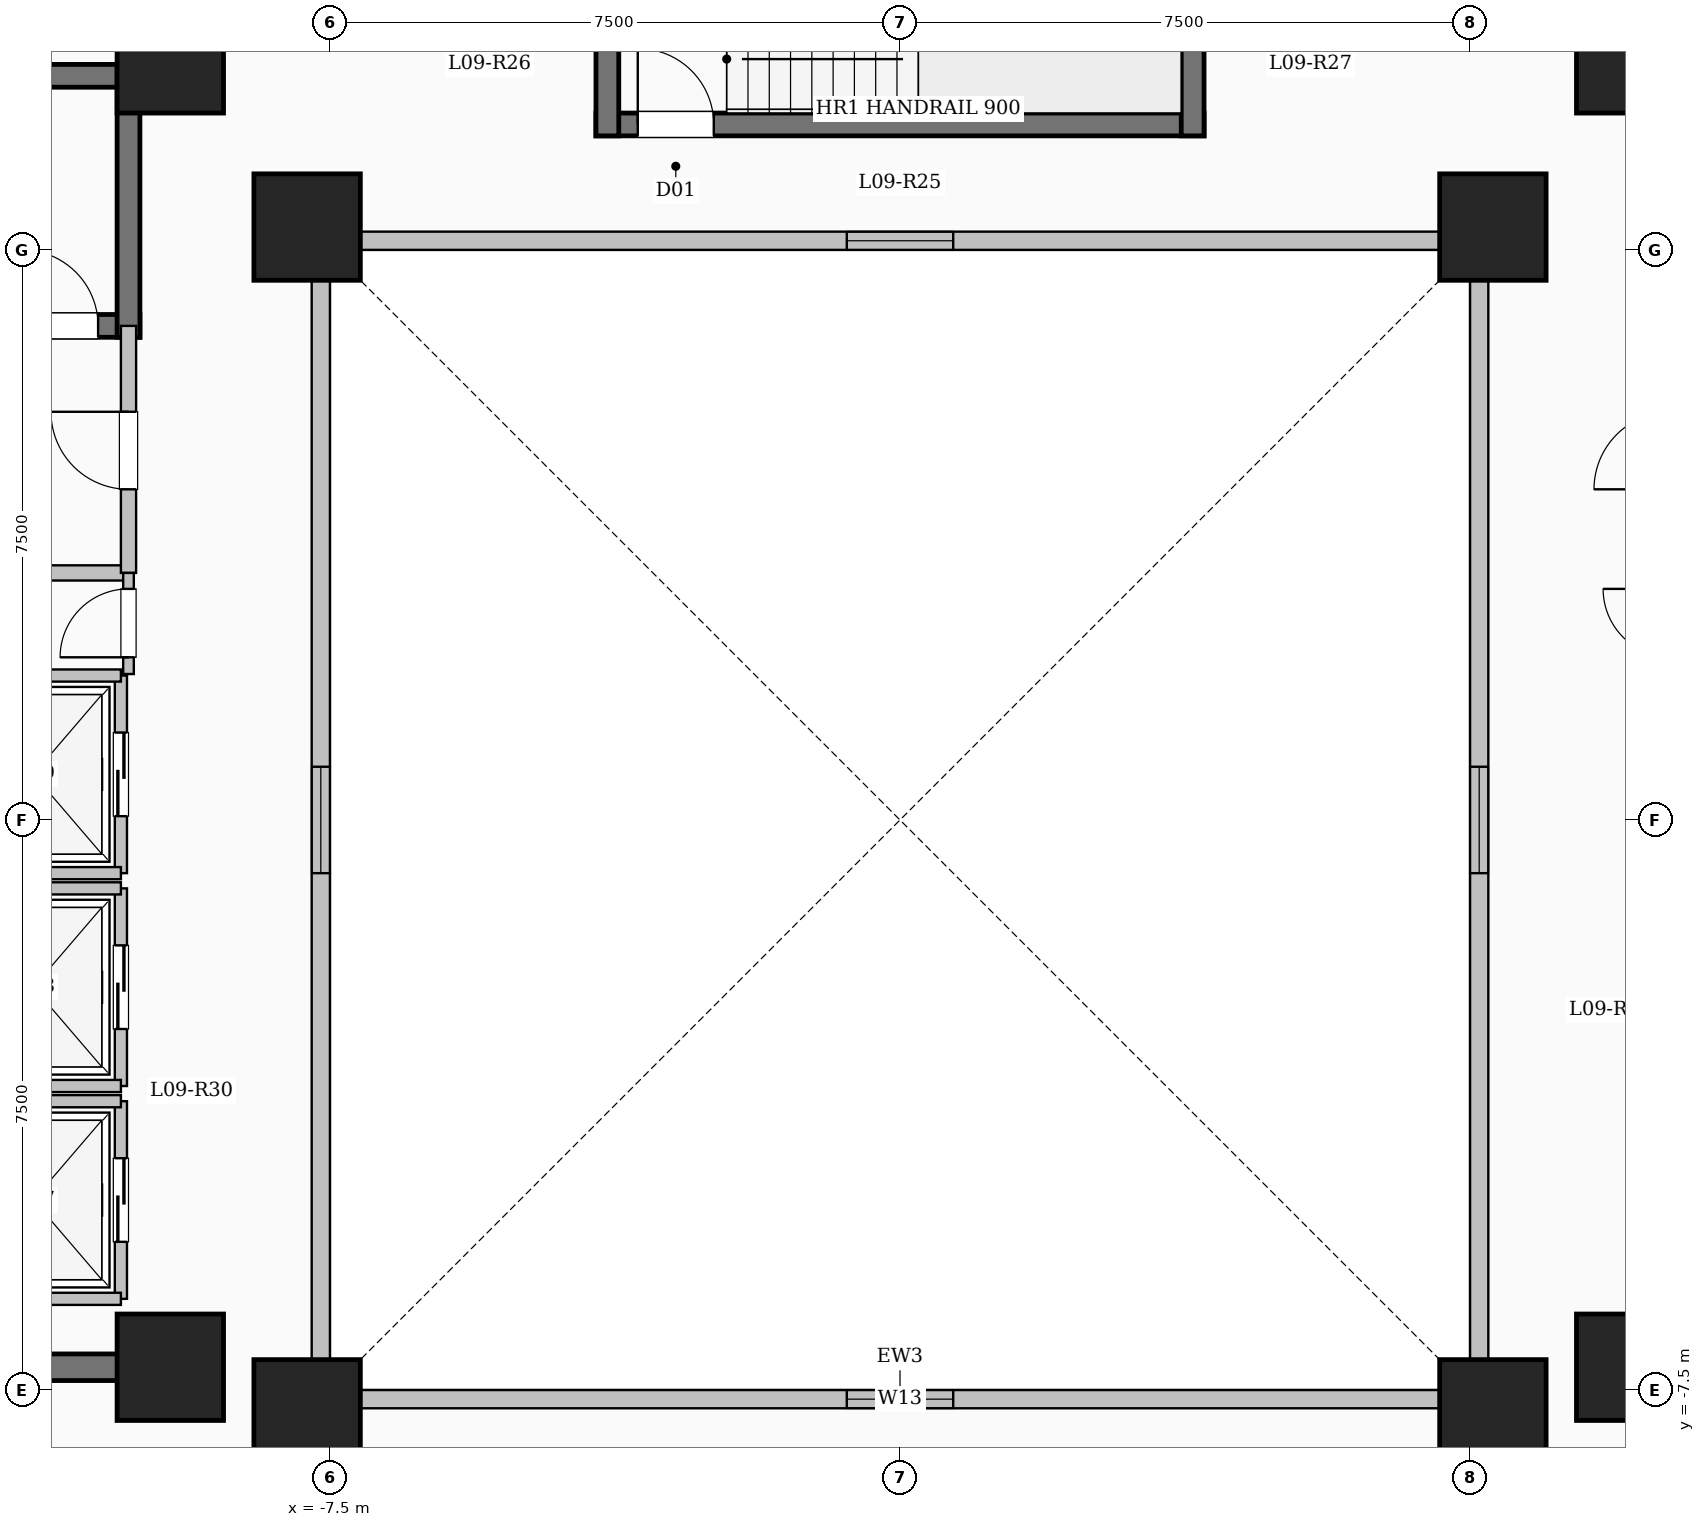
"""IFC4 building model, lengths in metres.
Left out: names, types, materials, properties, quantities, classifications, styles, units other than length and angle.
Written with IfcOpenShell. Run it as: python <this file> out.ifc"""

import sys

from ifc_helpers import new_model, si_unit, direction, frame, frame_2d, origin, origin_2d, place, context, subcontext, project, spatial, rectangle, extrude, element, fill, save


model = new_model("IFC4")
c1 = context("Model", 3, precision=1e-05, world=origin(), true_north=direction((0.0, 1.0)))
c2 = subcontext(c1, "Body", "Model", "MODEL_VIEW")
j1 = project(units=[si_unit("LENGTHUNIT", "METRE"), si_unit("PLANEANGLEUNIT", "RADIAN")], contexts=[c1])
p1 = place(None, origin())
s1 = spatial("IfcSite", under=j1, at=p1, CompositionType="ELEMENT")
p2 = place(p1, origin())
s2 = spatial("IfcBuilding", under=s1, at=p2, CompositionType="ELEMENT")
p3 = place(p2, frame((0.0, 0.0, 37.4)))
s3 = spatial("IfcBuildingStorey", under=s2, at=p3, CompositionType="ELEMENT", Elevation=37.4)
for number, where, z_axis, x_axis in (
    (1, (-7.8, -7.8, 0.0), (0.0, 0.0, 1.0), (1.0, 0.0, 0.0)),
    (2, (7.8, -7.8, 0.0), (0.0, 0.0, 1.0), (1.0, 0.0, 0.0)),
    (3, (-7.8, 7.8, 0.0), (0.0, 0.0, 1.0), (1.0, 0.0, 0.0)),
    (4, (7.8, 7.8, 0.0), (0.0, 0.0, 1.0), (1.0, 0.0, 0.0)),
    (5, (-9.6, -7.2, 0.0), (0.0, 0.0, 1.0), (1.0, 0.0, 0.0)),
    (6, (-9.6, 10.0, 0.0), (0.0, 0.0, 1.0), (1.0, 0.0, 0.0)),
    (7, (9.6, -7.2, 0.0), (0.0, 0.0, 1.0), (1.0, 0.0, 0.0)),
    (8, (9.6, 10.0, 0.0), (0.0, 0.0, 1.0), (1.0, 0.0, 0.0)),
):
    element("IfcColumn", number, at=place(p3, frame(where, z_axis=z_axis, x_axis=x_axis)), inside=s3, PredefinedType="COLUMN", context=c2, shape_type="SweptSolid", body=[
        extrude(rectangle(XDim=1.4, YDim=1.4, at=origin_2d()), origin(), (0.0, 0.0, 1.0), 3.35),
    ])
p4 = place(p3, frame((-7.62, -7.62, 0.0), z_axis=(0.0, 0.0, 1.0), x_axis=(1.0, 0.0, 0.0)))
e9 = element("IfcWall", 9, at=p4, inside=s3, PredefinedType="SOLIDWALL", context=c2, shape_type="SweptSolid", body=[
    extrude(rectangle(XDim=15.24, YDim=0.24, at=frame_2d((7.62, 0.0))), origin(), (0.0, 0.0, 1.0), 3.1),
])
p5 = place(p4, frame((6.92, 0.0, 0.95)))
e10 = element("IfcOpeningElement", 10, at=p5, cuts=e9, PredefinedType="OPENING", context=c2, shape_type="SweptSolid", body=[
    extrude(rectangle(XDim=1.4, YDim=1.5, at=frame_2d((0.7, 0.75))), frame((0.0, 0.13, 0.0), z_axis=(0.0, -1.0, 0.0), x_axis=(1.0, 0.0, 0.0)), (0.0, 0.0, 1.0), 0.26),
])
p6 = place(p3, frame((7.62, -7.62, 0.0), z_axis=(0.0, 0.0, 1.0), x_axis=(0.0, 1.0, 0.0)))
e11 = element("IfcWall", 11, at=p6, inside=s3, PredefinedType="SOLIDWALL", context=c2, shape_type="SweptSolid", body=[
    extrude(rectangle(XDim=15.24, YDim=0.24, at=frame_2d((7.62, 0.0))), origin(), (0.0, 0.0, 1.0), 3.1),
])
p7 = place(p6, frame((6.92, 0.0, 0.95)))
e12 = element("IfcOpeningElement", 12, at=p7, cuts=e11, PredefinedType="OPENING", context=c2, shape_type="SweptSolid", body=[
    extrude(rectangle(XDim=1.4, YDim=1.5, at=frame_2d((0.7, 0.75))), frame((0.0, 0.13, 0.0), z_axis=(0.0, -1.0, 0.0), x_axis=(1.0, 0.0, 0.0)), (0.0, 0.0, 1.0), 0.26),
])
p8 = place(p3, frame((7.62, 7.62, 0.0), z_axis=(0.0, 0.0, 1.0), x_axis=(-1.0, 0.0, 0.0)))
e13 = element("IfcWall", 13, at=p8, inside=s3, PredefinedType="SOLIDWALL", context=c2, shape_type="SweptSolid", body=[
    extrude(rectangle(XDim=15.24, YDim=0.24, at=frame_2d((7.62, 0.0))), origin(), (0.0, 0.0, 1.0), 3.1),
])
p9 = place(p8, frame((6.92, 0.0, 0.95)))
e14 = element("IfcOpeningElement", 14, at=p9, cuts=e13, PredefinedType="OPENING", context=c2, shape_type="SweptSolid", body=[
    extrude(rectangle(XDim=1.4, YDim=1.5, at=frame_2d((0.7, 0.75))), frame((0.0, 0.13, 0.0), z_axis=(0.0, -1.0, 0.0), x_axis=(1.0, 0.0, 0.0)), (0.0, 0.0, 1.0), 0.26),
])
p10 = place(p3, frame((-7.62, 7.62, 0.0), z_axis=(0.0, 0.0, 1.0), x_axis=(0.0, -1.0, 0.0)))
e15 = element("IfcWall", 15, at=p10, inside=s3, PredefinedType="SOLIDWALL", context=c2, shape_type="SweptSolid", body=[
    extrude(rectangle(XDim=15.24, YDim=0.24, at=frame_2d((7.62, 0.0))), origin(), (0.0, 0.0, 1.0), 3.1),
])
p11 = place(p10, frame((6.92, 0.0, 0.95)))
e16 = element("IfcOpeningElement", 16, at=p11, cuts=e15, PredefinedType="OPENING", context=c2, shape_type="SweptSolid", body=[
    extrude(rectangle(XDim=1.4, YDim=1.5, at=frame_2d((0.7, 0.75))), frame((0.0, 0.13, 0.0), z_axis=(0.0, -1.0, 0.0), x_axis=(1.0, 0.0, 0.0)), (0.0, 0.0, 1.0), 0.26),
])
p12 = place(p3, frame((-18.0, 9.79, 0.0), z_axis=(0.0, 0.0, 1.0), x_axis=(1.0, 0.0, 0.0)))
e17 = element("IfcWall", 17, at=p12, inside=s3, PredefinedType="SHEAR", context=c2, shape_type="SweptSolid", body=[
    extrude(rectangle(XDim=8.0, YDim=0.3, at=frame_2d((4.0, 0.0))), origin(), (0.0, 0.0, 1.0), 3.35),
])
p13 = place(p3, frame((-18.0, 6.5, 0.0), z_axis=(0.0, 0.0, 1.0), x_axis=(1.0, 0.0, 0.0)))
e18 = element("IfcWall", 18, at=p13, inside=s3, PredefinedType="SHEAR", context=c2, shape_type="SweptSolid", body=[
    extrude(rectangle(XDim=8.0, YDim=0.3, at=frame_2d((4.0, 0.0))), origin(), (0.0, 0.0, 1.0), 3.35),
])
p14 = place(p13, frame((6.45, 0.0, 0.0)))
e19 = element("IfcOpeningElement", 19, at=p14, cuts=e18, PredefinedType="OPENING", context=c2, shape_type="SweptSolid", body=[
    extrude(rectangle(XDim=1.0, YDim=2.15, at=frame_2d((0.5, 1.075))), frame((0.0, 0.16, 0.0), z_axis=(0.0, -1.0, 0.0), x_axis=(1.0, 0.0, 0.0)), (0.0, 0.0, 1.0), 0.32),
])
p15 = place(p3, frame((-10.15, 6.35, 0.0), z_axis=(0.0, 0.0, 1.0), x_axis=(0.0, 1.0, 0.0)))
e20 = element("IfcWall", 20, at=p15, inside=s3, PredefinedType="SHEAR", context=c2, shape_type="SweptSolid", body=[
    extrude(rectangle(XDim=3.59, YDim=0.3, at=frame_2d((1.795, 0.0))), origin(), (0.0, 0.0, 1.0), 3.35),
])
p16 = place(p3, frame((-4.0, 9.15, 0.0), z_axis=(0.0, 0.0, 1.0), x_axis=(1.0, 0.0, 0.0)))
e21 = element("IfcWall", 21, at=p16, inside=s3, PredefinedType="SHEAR", context=c2, shape_type="SweptSolid", body=[
    extrude(rectangle(XDim=8.0, YDim=0.3, at=frame_2d((4.0, 0.0))), origin(), (0.0, 0.0, 1.0), 3.35),
])
p17 = place(p16, frame((0.55, 0.0, 0.0)))
e22 = element("IfcOpeningElement", 22, at=p17, cuts=e21, PredefinedType="OPENING", context=c2, shape_type="SweptSolid", body=[
    extrude(rectangle(XDim=1.0, YDim=2.15, at=frame_2d((0.5, 1.075))), frame((0.0, 0.16, 0.0), z_axis=(0.0, -1.0, 0.0), x_axis=(1.0, 0.0, 0.0)), (0.0, 0.0, 1.0), 0.32),
])
for number, where, z_axis, x_axis in (
    (23, (-3.85, 9.0, 0.0), (0.0, 0.0, 1.0), (0.0, 1.0, 0.0)),
    (24, (3.85, 9.0, 0.0), (0.0, 0.0, 1.0), (0.0, 1.0, 0.0)),
):
    element("IfcWall", number, at=place(p3, frame(where, z_axis=z_axis, x_axis=x_axis)), inside=s3, PredefinedType="SHEAR", context=c2, shape_type="SweptSolid", body=[
        extrude(rectangle(XDim=3.59, YDim=0.3, at=frame_2d((1.795, 0.0))), origin(), (0.0, 0.0, 1.0), 3.35),
    ])
p18 = place(p3, frame((-15.55, 3.25, 0.0), z_axis=(0.0, 0.0, 1.0), x_axis=(1.0, 0.0, 0.0)))
e25 = element("IfcWall", 25, at=p18, inside=s3, PredefinedType="SOLIDWALL", context=c2, shape_type="SweptSolid", body=[
    extrude(rectangle(XDim=5.4, YDim=0.2, at=frame_2d((2.7, 0.0))), origin(), (0.0, 0.0, 1.0), 3.1),
])
p19 = place(p3, frame((-10.15, 3.25, 0.0), z_axis=(0.0, 0.0, 1.0), x_axis=(0.0, 1.0, 0.0)))
e26 = element("IfcWall", 26, at=p19, inside=s3, PredefinedType="SOLIDWALL", context=c2, shape_type="SweptSolid", body=[
    extrude(rectangle(XDim=3.25, YDim=0.2, at=frame_2d((1.625, 0.0))), origin(), (0.0, 0.0, 1.0), 3.1),
])
p20 = place(p19, frame((1.1, 0.0, 0.0)))
e27 = element("IfcOpeningElement", 27, at=p20, cuts=e26, PredefinedType="OPENING", context=c2, shape_type="SweptSolid", body=[
    extrude(rectangle(XDim=1.02, YDim=2.15, at=frame_2d((0.51, 1.075))), frame((0.0, 0.11, 0.0), z_axis=(0.0, -1.0, 0.0), x_axis=(1.0, 0.0, 0.0)), (0.0, 0.0, 1.0), 0.22),
])
p21 = place(p3, frame((-10.25, -6.3, 0.0), z_axis=(0.0, 0.0, 1.0), x_axis=(0.0, 1.0, 0.0)))
e28 = element("IfcWall", 28, at=p21, inside=s3, PredefinedType="SOLIDWALL", context=c2, shape_type="SweptSolid", body=[
    extrude(rectangle(XDim=2.6, YDim=0.16, at=frame_2d((1.3, 0.0))), origin(), (0.0, 0.0, 1.0), 3.1),
])
p22 = place(p21, frame((0.75, 0.0, 0.0)))
e29 = element("IfcOpeningElement", 29, at=p22, cuts=e28, PredefinedType="OPENING", context=c2, shape_type="SweptSolid", body=[
    extrude(rectangle(XDim=1.1, YDim=2.15, at=frame_2d((0.55, 1.075))), frame((0.0, 0.09, 0.0), z_axis=(0.0, -1.0, 0.0), x_axis=(1.0, 0.0, 0.0)), (0.0, 0.0, 1.0), 0.18),
])
for number, where, z_axis, x_axis in (
    (30, (-12.55, -6.3, 0.0), (0.0, 0.0, 1.0), (1.0, 0.0, 0.0)),
    (31, (-12.55, -3.7, 0.0), (0.0, 0.0, 1.0), (1.0, 0.0, 0.0)),
):
    element("IfcWall", number, at=place(p3, frame(where, z_axis=z_axis, x_axis=x_axis)), inside=s3, PredefinedType="SOLIDWALL", context=c2, shape_type="SweptSolid", body=[
        extrude(rectangle(XDim=2.3, YDim=0.16, at=frame_2d((1.15, 0.0))), origin(), (0.0, 0.0, 1.0), 3.1),
    ])
p23 = place(p3, frame((-10.25, -3.5, 0.0), z_axis=(0.0, 0.0, 1.0), x_axis=(0.0, 1.0, 0.0)))
e32 = element("IfcWall", 32, at=p23, inside=s3, PredefinedType="SOLIDWALL", context=c2, shape_type="SweptSolid", body=[
    extrude(rectangle(XDim=2.6, YDim=0.16, at=frame_2d((1.3, 0.0))), origin(), (0.0, 0.0, 1.0), 3.1),
])
p24 = place(p23, frame((0.75, 0.0, 0.0)))
e33 = element("IfcOpeningElement", 33, at=p24, cuts=e32, PredefinedType="OPENING", context=c2, shape_type="SweptSolid", body=[
    extrude(rectangle(XDim=1.1, YDim=2.15, at=frame_2d((0.55, 1.075))), frame((0.0, 0.09, 0.0), z_axis=(0.0, -1.0, 0.0), x_axis=(1.0, 0.0, 0.0)), (0.0, 0.0, 1.0), 0.18),
])
for number, where, z_axis, x_axis in (
    (34, (-12.55, -3.5, 0.0), (0.0, 0.0, 1.0), (1.0, 0.0, 0.0)),
    (35, (-12.55, -0.9, 0.0), (0.0, 0.0, 1.0), (1.0, 0.0, 0.0)),
):
    element("IfcWall", number, at=place(p3, frame(where, z_axis=z_axis, x_axis=x_axis)), inside=s3, PredefinedType="SOLIDWALL", context=c2, shape_type="SweptSolid", body=[
        extrude(rectangle(XDim=2.3, YDim=0.16, at=frame_2d((1.15, 0.0))), origin(), (0.0, 0.0, 1.0), 3.1),
    ])
p25 = place(p3, frame((-10.25, -0.7, 0.0), z_axis=(0.0, 0.0, 1.0), x_axis=(0.0, 1.0, 0.0)))
e36 = element("IfcWall", 36, at=p25, inside=s3, PredefinedType="SOLIDWALL", context=c2, shape_type="SweptSolid", body=[
    extrude(rectangle(XDim=2.6, YDim=0.16, at=frame_2d((1.3, 0.0))), origin(), (0.0, 0.0, 1.0), 3.1),
])
p26 = place(p25, frame((0.75, 0.0, 0.0)))
e37 = element("IfcOpeningElement", 37, at=p26, cuts=e36, PredefinedType="OPENING", context=c2, shape_type="SweptSolid", body=[
    extrude(rectangle(XDim=1.1, YDim=2.15, at=frame_2d((0.55, 1.075))), frame((0.0, 0.09, 0.0), z_axis=(0.0, -1.0, 0.0), x_axis=(1.0, 0.0, 0.0)), (0.0, 0.0, 1.0), 0.18),
])
for number, where, z_axis, x_axis in (
    (38, (-12.55, -0.7, 0.0), (0.0, 0.0, 1.0), (1.0, 0.0, 0.0)),
    (39, (-12.55, 1.9, 0.0), (0.0, 0.0, 1.0), (1.0, 0.0, 0.0)),
):
    element("IfcWall", number, at=place(p3, frame(where, z_axis=z_axis, x_axis=x_axis)), inside=s3, PredefinedType="SOLIDWALL", context=c2, shape_type="SweptSolid", body=[
        extrude(rectangle(XDim=2.3, YDim=0.16, at=frame_2d((1.15, 0.0))), origin(), (0.0, 0.0, 1.0), 3.1),
    ])
p27 = place(p3, frame((-18.625, -7.2, 0.0), z_axis=(0.0, 0.0, 1.0), x_axis=(1.0, 0.0, 0.0)))
e40 = element("IfcWall", 40, at=p27, inside=s3, PredefinedType="SHEAR", context=c2, shape_type="SweptSolid", body=[
    extrude(rectangle(XDim=8.55, YDim=0.35, at=frame_2d((4.275, 0.0))), origin(), (0.0, 0.0, 1.0), 3.35),
])
p28 = place(p3, frame((-10.15, 1.92, 0.0), z_axis=(0.0, 0.0, 1.0), x_axis=(0.0, 1.0, 0.0)))
e41 = element("IfcWall", 41, at=p28, inside=s3, PredefinedType="PARTITIONING", context=c2, shape_type="SweptSolid", body=[
    extrude(rectangle(XDim=1.33, YDim=0.14, at=frame_2d((0.665, 0.0))), origin(), (0.0, 0.0, 1.0), 3.1),
])
p29 = place(p28, frame((0.22, 0.0, 0.0)))
e42 = element("IfcOpeningElement", 42, at=p29, cuts=e41, PredefinedType="OPENING", context=c2, shape_type="SweptSolid", body=[
    extrude(rectangle(XDim=0.9, YDim=2.08, at=frame_2d((0.45, 1.04))), frame((0.0, 0.08, 0.0), z_axis=(0.0, -1.0, 0.0), x_axis=(1.0, 0.0, 0.0)), (0.0, 0.0, 1.0), 0.16),
])
p30 = place(p5, origin())
e43 = element("IfcWindow", 43, at=p30, inside=s3, PartitioningType="SINGLE_PANEL", PredefinedType="WINDOW", context=c2, shape_type="SweptSolid", body=[
    extrude(rectangle(XDim=1.4, YDim=1.5, at=frame_2d((0.7, 0.75))), frame((0.0, 0.03, 0.0), z_axis=(0.0, -1.0, 0.0), x_axis=(1.0, 0.0, 0.0)), (0.0, 0.0, 1.0), 0.06),
])
fill(e10, e43)
p31 = place(p7, origin())
e44 = element("IfcWindow", 44, at=p31, inside=s3, PartitioningType="SINGLE_PANEL", PredefinedType="WINDOW", context=c2, shape_type="SweptSolid", body=[
    extrude(rectangle(XDim=1.4, YDim=1.5, at=frame_2d((0.7, 0.75))), frame((0.0, 0.03, 0.0), z_axis=(0.0, -1.0, 0.0), x_axis=(1.0, 0.0, 0.0)), (0.0, 0.0, 1.0), 0.06),
])
fill(e12, e44)
p32 = place(p9, origin())
e45 = element("IfcWindow", 45, at=p32, inside=s3, PartitioningType="SINGLE_PANEL", PredefinedType="WINDOW", context=c2, shape_type="SweptSolid", body=[
    extrude(rectangle(XDim=1.4, YDim=1.5, at=frame_2d((0.7, 0.75))), frame((0.0, 0.03, 0.0), z_axis=(0.0, -1.0, 0.0), x_axis=(1.0, 0.0, 0.0)), (0.0, 0.0, 1.0), 0.06),
])
fill(e14, e45)
p33 = place(p11, origin())
e46 = element("IfcWindow", 46, at=p33, inside=s3, PartitioningType="SINGLE_PANEL", PredefinedType="WINDOW", context=c2, shape_type="SweptSolid", body=[
    extrude(rectangle(XDim=1.4, YDim=1.5, at=frame_2d((0.7, 0.75))), frame((0.0, 0.03, 0.0), z_axis=(0.0, -1.0, 0.0), x_axis=(1.0, 0.0, 0.0)), (0.0, 0.0, 1.0), 0.06),
])
fill(e16, e46)
p34 = place(p14, origin())
e47 = element("IfcDoor", 47, at=p34, inside=s3, OperationType="SINGLE_SWING_LEFT", PredefinedType="DOOR", context=c2, shape_type="SweptSolid", body=[
    extrude(rectangle(XDim=1.0, YDim=2.15, at=frame_2d((0.5, 1.075))), frame((0.0, 0.025, 0.0), z_axis=(0.0, -1.0, 0.0), x_axis=(1.0, 0.0, 0.0)), (0.0, 0.0, 1.0), 0.05),
])
fill(e19, e47)
p35 = place(p17, origin())
e48 = element("IfcDoor", 48, at=p35, inside=s3, OperationType="SINGLE_SWING_LEFT", PredefinedType="DOOR", context=c2, shape_type="SweptSolid", body=[
    extrude(rectangle(XDim=1.0, YDim=2.15, at=frame_2d((0.5, 1.075))), frame((0.0, 0.025, 0.0), z_axis=(0.0, -1.0, 0.0), x_axis=(1.0, 0.0, 0.0)), (0.0, 0.0, 1.0), 0.05),
])
fill(e22, e48)
p36 = place(p20, origin())
e49 = element("IfcDoor", 49, at=p36, inside=s3, OperationType="SINGLE_SWING_RIGHT", PredefinedType="DOOR", context=c2, shape_type="SweptSolid", body=[
    extrude(rectangle(XDim=1.02, YDim=2.15, at=frame_2d((0.51, 1.075))), frame((0.0, 0.025, 0.0), z_axis=(0.0, -1.0, 0.0), x_axis=(1.0, 0.0, 0.0)), (0.0, 0.0, 1.0), 0.05),
])
fill(e27, e49)
p37 = place(p22, origin())
e50 = element("IfcDoor", 50, at=p37, inside=s3, OperationType="SLIDING_TO_LEFT", PredefinedType="DOOR", context=c2, shape_type="SweptSolid", body=[
    extrude(rectangle(XDim=1.1, YDim=2.15, at=frame_2d((0.55, 1.075))), frame((0.0, 0.025, 0.0), z_axis=(0.0, -1.0, 0.0), x_axis=(1.0, 0.0, 0.0)), (0.0, 0.0, 1.0), 0.05),
])
fill(e29, e50)
p38 = place(p24, origin())
e51 = element("IfcDoor", 51, at=p38, inside=s3, OperationType="SLIDING_TO_LEFT", PredefinedType="DOOR", context=c2, shape_type="SweptSolid", body=[
    extrude(rectangle(XDim=1.1, YDim=2.15, at=frame_2d((0.55, 1.075))), frame((0.0, 0.025, 0.0), z_axis=(0.0, -1.0, 0.0), x_axis=(1.0, 0.0, 0.0)), (0.0, 0.0, 1.0), 0.05),
])
fill(e33, e51)
p39 = place(p26, origin())
e52 = element("IfcDoor", 52, at=p39, inside=s3, OperationType="SLIDING_TO_LEFT", PredefinedType="DOOR", context=c2, shape_type="SweptSolid", body=[
    extrude(rectangle(XDim=1.1, YDim=2.15, at=frame_2d((0.55, 1.075))), frame((0.0, 0.025, 0.0), z_axis=(0.0, -1.0, 0.0), x_axis=(1.0, 0.0, 0.0)), (0.0, 0.0, 1.0), 0.05),
])
fill(e37, e52)
p40 = place(p29, origin())
e53 = element("IfcDoor", 53, at=p40, inside=s3, OperationType="SINGLE_SWING_LEFT", PredefinedType="DOOR", context=c2, shape_type="SweptSolid", body=[
    extrude(rectangle(XDim=0.9, YDim=2.08, at=frame_2d((0.45, 1.04))), frame((0.0, 0.025, 0.0), z_axis=(0.0, -1.0, 0.0), x_axis=(1.0, 0.0, 0.0)), (0.0, 0.0, 1.0), 0.05),
])
fill(e42, e53)
save(model, sys.argv[1])
